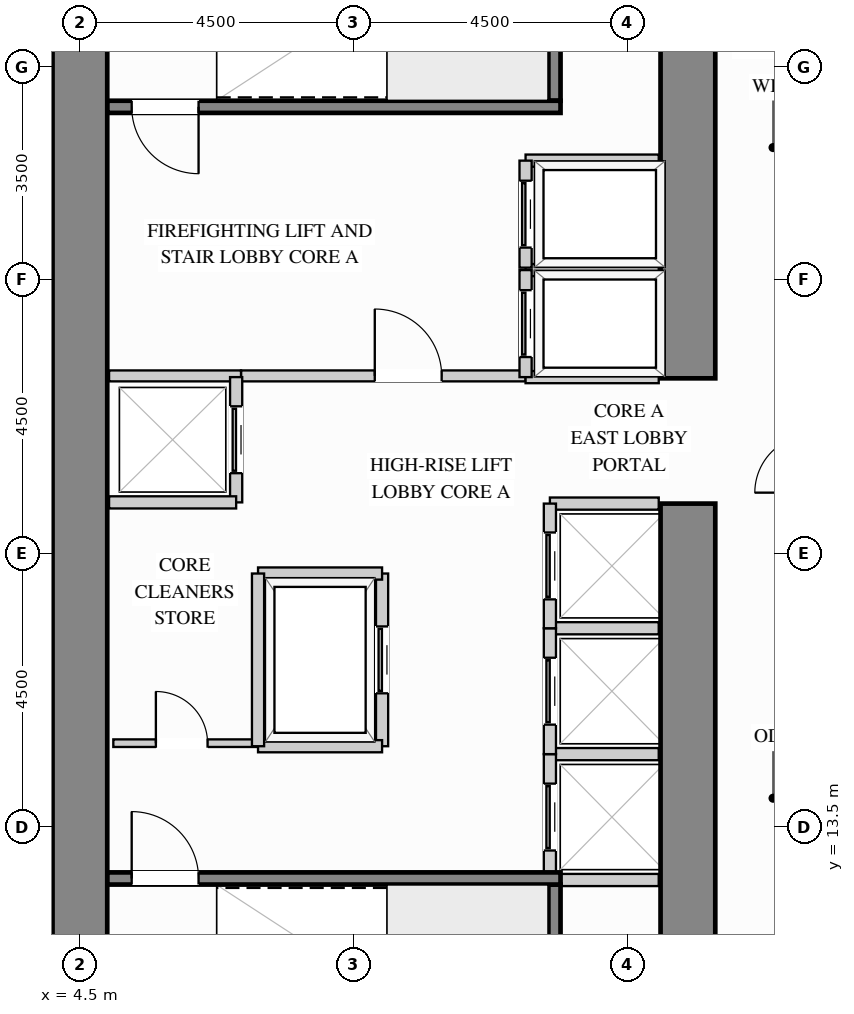
"""IFC4 building model, lengths in metres.
Left out: names, types, materials, properties, quantities, classifications, styles, units other than length and angle.
Written with IfcOpenShell. Run it as: python <this file> out.ifc"""

import sys

from ifc_helpers import new_model, si_unit, direction, frame, frame_2d, origin, place, context, subcontext, project, spatial, rectangle, extrude, source, transform, mapped, element, fill, save


model = new_model("IFC4")
c1 = context("Model", 3, precision=1e-05, world=origin(), true_north=direction((0.0, 1.0)))
c2 = subcontext(c1, "Body", "Model", "MODEL_VIEW")
j1 = project(units=[si_unit("LENGTHUNIT", "METRE"), si_unit("PLANEANGLEUNIT", "RADIAN")], contexts=[c1])
p1 = place(None, origin())
s1 = spatial("IfcSite", under=j1, at=p1, CompositionType="ELEMENT")
p2 = place(p1, origin())
s2 = spatial("IfcBuilding", under=s1, at=p2, CompositionType="ELEMENT")
p3 = place(p2, frame((0.0, 0.0, 69.3)))
s3 = spatial("IfcBuildingStorey", under=s2, at=p3, CompositionType="ELEMENT", Elevation=69.3)
m1 = source(origin(), c2, "Body", "SweptSolid", [
    extrude(rectangle(XDim=9.87, YDim=0.9, at=frame_2d((4.935, 0.0))), origin(), (0.0, 0.0, 1.0), 3.32),
])
p4 = place(p3, frame((14.5, 8.95, 0.0), z_axis=(0.0, 0.0, 1.0), x_axis=(0.0, 1.0, 0.0)))
e1 = element("IfcWall", 1, at=p4, inside=s3, PredefinedType="SHEAR", context=c2, shape_type="MappedRepresentation", body=[
    mapped(m1, transform((0.0, 0.0, 0.0), x_axis=(1.0, 0.0, 0.0), y_axis=(0.0, 1.0, 0.0), z_axis=(0.0, 0.0, 1.0))),
])
m2 = source(origin(), c2, "Body", "SweptSolid", [
    extrude(rectangle(XDim=8.17, YDim=0.9, at=frame_2d((4.085, 0.0))), origin(), (0.0, 0.0, 1.0), 3.32),
])
p5 = place(p3, frame((14.5, 20.88, 0.0), z_axis=(0.0, 0.0, 1.0), x_axis=(0.0, 1.0, 0.0)))
e2 = element("IfcWall", 2, at=p5, inside=s3, PredefinedType="SHEAR", context=c2, shape_type="MappedRepresentation", body=[
    mapped(m2, transform((0.0, 0.0, 0.0), x_axis=(1.0, 0.0, 0.0), y_axis=(0.0, 1.0, 0.0), z_axis=(0.0, 0.0, 1.0))),
])
m3 = source(origin(), c2, "Body", "SweptSolid", [
    extrude(rectangle(XDim=20.1, YDim=0.9, at=frame_2d((10.05, 0.0))), origin(), (0.0, 0.0, 1.0), 3.32),
])
p6 = place(p3, frame((4.5, 8.95, 0.0), z_axis=(0.0, 0.0, 1.0), x_axis=(0.0, 1.0, 0.0)))
e3 = element("IfcWall", 3, at=p6, inside=s3, PredefinedType="SHEAR", context=c2, shape_type="MappedRepresentation", body=[
    mapped(m3, transform((0.0, 0.0, 0.0), x_axis=(1.0, 0.0, 0.0), y_axis=(0.0, 1.0, 0.0), z_axis=(0.0, 0.0, 1.0))),
])
p7 = place(p3, frame((7.15, 20.92, 0.0), z_axis=(0.0, 0.0, 1.0), x_axis=(1.0, 0.0, 0.0)))
e4 = element("IfcWall", 4, at=p7, inside=s3, PredefinedType="PARTITIONING", context=c2, shape_type="SweptSolid", body=[
    extrude(rectangle(XDim=4.68, YDim=0.18, at=frame_2d((2.34, 0.0))), origin(), (0.0, 0.0, 1.0), 3.305),
])
p8 = place(p7, frame((2.2, 0.0, 0.0)))
e5 = element("IfcOpeningElement", 5, at=p8, cuts=e4, PredefinedType="OPENING", context=c2, shape_type="SweptSolid", body=[
    extrude(rectangle(XDim=1.1, YDim=2.15, at=frame_2d((0.55, 1.075))), frame((0.0, 0.1, 0.0), z_axis=(0.0, -1.0, 0.0), x_axis=(1.0, 0.0, 0.0)), (0.0, 0.0, 1.0), 0.2),
])
m4 = source(origin(), c2, "Body", "SweptSolid", [
    extrude(rectangle(XDim=2.17, YDim=0.18, at=frame_2d((1.085, 0.0))), origin(), (0.0, 0.0, 1.0), 3.305),
])
p9 = place(p3, frame((4.98, 20.92, 0.0), z_axis=(0.0, 0.0, 1.0), x_axis=(1.0, 0.0, 0.0)))
e6 = element("IfcWall", 6, at=p9, inside=s3, PredefinedType="PARTITIONING", context=c2, shape_type="MappedRepresentation", body=[
    mapped(m4, transform((0.0, 0.0, 0.0), x_axis=(1.0, 0.0, 0.0), y_axis=(0.0, 1.0, 0.0), z_axis=(0.0, 0.0, 1.0))),
])
p10 = place(p3, frame((5.05, 14.88, 0.0), z_axis=(0.0, 0.0, 1.0), x_axis=(1.0, 0.0, 0.0)))
e7 = element("IfcWall", 7, at=p10, inside=s3, PredefinedType="PARTITIONING", context=c2, shape_type="SweptSolid", body=[
    extrude(rectangle(XDim=2.35, YDim=0.125, at=frame_2d((1.175, 0.0))), origin(), (0.0, 0.0, 1.0), 3.305),
])
p11 = place(p10, frame((0.7, 0.0, 0.0)))
e8 = element("IfcOpeningElement", 8, at=p11, cuts=e7, PredefinedType="OPENING", context=c2, shape_type="SweptSolid", body=[
    extrude(rectangle(XDim=0.85, YDim=2.1, at=frame_2d((0.425, 1.05))), frame((0.0, 0.073, 0.0), z_axis=(0.0, -1.0, 0.0), x_axis=(1.0, 0.0, 0.0)), (0.0, 0.0, 1.0), 0.145),
])
m5 = source(origin(), c2, "Body", "SweptSolid", [
    extrude(rectangle(XDim=2.19, YDim=0.2, at=frame_2d((1.095, 0.0))), origin(), (0.0, 0.0, 1.0), 3.305),
])
for number, where, z_axis, x_axis in (
    (9, (11.83, 22.66, 0.0), (0.0, 0.0, 1.0), (1.0, 0.0, 0.0)),
    (10, (11.83, 20.9, 0.0), (0.0, 0.0, 1.0), (1.0, 0.0, 0.0)),
):
    element("IfcWall", number, at=place(p3, frame(where, z_axis=z_axis, x_axis=x_axis)), inside=s3, PredefinedType="PARTITIONING", context=c2, shape_type="MappedRepresentation", body=[
        mapped(m5, transform((0.0, 0.0, 0.0), x_axis=(1.0, 0.0, 0.0), y_axis=(0.0, 1.0, 0.0), z_axis=(0.0, 0.0, 1.0))),
    ])
p12 = place(p3, frame((11.83, 20.9, 0.0), z_axis=(0.0, 0.0, 1.0), x_axis=(0.0, 1.0, 0.0)))
e11 = element("IfcWall", 11, at=p12, inside=s3, PredefinedType="PARTITIONING", context=c2, shape_type="SweptSolid", body=[
    extrude(rectangle(XDim=1.76, YDim=0.2, at=frame_2d((0.88, 0.0))), origin(), (0.0, 0.0, 1.0), 3.305),
])
p13 = place(p12, frame((0.33, 0.0, 0.0)))
e12 = element("IfcOpeningElement", 12, at=p13, cuts=e11, PredefinedType="OPENING", context=c2, shape_type="SweptSolid", body=[
    extrude(rectangle(XDim=1.1, YDim=2.2, at=frame_2d((0.55, 1.1))), frame((0.0, 0.11, 0.0), z_axis=(0.0, -1.0, 0.0), x_axis=(1.0, 0.0, 0.0)), (0.0, 0.0, 1.0), 0.22),
])
p14 = place(p3, frame((11.83, 24.46, 0.0), z_axis=(0.0, 0.0, 1.0), x_axis=(1.0, 0.0, 0.0)))
e13 = element("IfcWall", 13, at=p14, inside=s3, PredefinedType="PARTITIONING", context=c2, shape_type="MappedRepresentation", body=[
    mapped(m5, transform((0.0, 0.0, 0.0), x_axis=(1.0, 0.0, 0.0), y_axis=(0.0, 1.0, 0.0), z_axis=(0.0, 0.0, 1.0))),
])
p15 = place(p3, frame((11.83, 22.7, 0.0), z_axis=(0.0, 0.0, 1.0), x_axis=(0.0, 1.0, 0.0)))
e14 = element("IfcWall", 14, at=p15, inside=s3, PredefinedType="PARTITIONING", context=c2, shape_type="SweptSolid", body=[
    extrude(rectangle(XDim=1.76, YDim=0.2, at=frame_2d((0.88, 0.0))), origin(), (0.0, 0.0, 1.0), 3.305),
])
p16 = place(p15, frame((0.33, 0.0, 0.0)))
e15 = element("IfcOpeningElement", 15, at=p16, cuts=e14, PredefinedType="OPENING", context=c2, shape_type="SweptSolid", body=[
    extrude(rectangle(XDim=1.1, YDim=2.2, at=frame_2d((0.55, 1.1))), frame((0.0, 0.11, 0.0), z_axis=(0.0, -1.0, 0.0), x_axis=(1.0, 0.0, 0.0)), (0.0, 0.0, 1.0), 0.22),
])
m6 = source(origin(), c2, "Body", "SweptSolid", [
    extrude(rectangle(XDim=1.79, YDim=0.2, at=frame_2d((0.895, 0.0))), origin(), (0.0, 0.0, 1.0), 3.305),
])
for number, where, z_axis, x_axis in (
    (16, (12.23, 14.7, 0.0), (0.0, 0.0, 1.0), (1.0, 0.0, 0.0)),
    (17, (12.23, 12.63, 0.0), (0.0, 0.0, 1.0), (1.0, 0.0, 0.0)),
):
    element("IfcWall", number, at=place(p3, frame(where, z_axis=z_axis, x_axis=x_axis)), inside=s3, PredefinedType="PARTITIONING", context=c2, shape_type="MappedRepresentation", body=[
        mapped(m6, transform((0.0, 0.0, 0.0), x_axis=(1.0, 0.0, 0.0), y_axis=(0.0, 1.0, 0.0), z_axis=(0.0, 0.0, 1.0))),
    ])
p17 = place(p3, frame((12.23, 12.63, 0.0), z_axis=(0.0, 0.0, 1.0), x_axis=(0.0, 1.0, 0.0)))
e18 = element("IfcWall", 18, at=p17, inside=s3, PredefinedType="PARTITIONING", context=c2, shape_type="SweptSolid", body=[
    extrude(rectangle(XDim=2.07, YDim=0.2, at=frame_2d((1.035, 0.0))), origin(), (0.0, 0.0, 1.0), 3.305),
])
p18 = place(p17, frame((0.485, 0.0, 0.0)))
e19 = element("IfcOpeningElement", 19, at=p18, cuts=e18, PredefinedType="OPENING", context=c2, shape_type="SweptSolid", body=[
    extrude(rectangle(XDim=1.1, YDim=2.2, at=frame_2d((0.55, 1.1))), frame((0.0, 0.11, 0.0), z_axis=(0.0, -1.0, 0.0), x_axis=(1.0, 0.0, 0.0)), (0.0, 0.0, 1.0), 0.22),
])
p19 = place(p3, frame((12.23, 16.77, 0.0), z_axis=(0.0, 0.0, 1.0), x_axis=(1.0, 0.0, 0.0)))
e20 = element("IfcWall", 20, at=p19, inside=s3, PredefinedType="PARTITIONING", context=c2, shape_type="MappedRepresentation", body=[
    mapped(m6, transform((0.0, 0.0, 0.0), x_axis=(1.0, 0.0, 0.0), y_axis=(0.0, 1.0, 0.0), z_axis=(0.0, 0.0, 1.0))),
])
p20 = place(p3, frame((12.23, 14.7, 0.0), z_axis=(0.0, 0.0, 1.0), x_axis=(0.0, 1.0, 0.0)))
e21 = element("IfcWall", 21, at=p20, inside=s3, PredefinedType="PARTITIONING", context=c2, shape_type="SweptSolid", body=[
    extrude(rectangle(XDim=2.07, YDim=0.2, at=frame_2d((1.035, 0.0))), origin(), (0.0, 0.0, 1.0), 3.305),
])
p21 = place(p20, frame((0.485, 0.0, 0.0)))
e22 = element("IfcOpeningElement", 22, at=p21, cuts=e21, PredefinedType="OPENING", context=c2, shape_type="SweptSolid", body=[
    extrude(rectangle(XDim=1.1, YDim=2.2, at=frame_2d((0.55, 1.1))), frame((0.0, 0.11, 0.0), z_axis=(0.0, -1.0, 0.0), x_axis=(1.0, 0.0, 0.0)), (0.0, 0.0, 1.0), 0.22),
])
p22 = place(p3, frame((12.23, 18.82, 0.0), z_axis=(0.0, 0.0, 1.0), x_axis=(1.0, 0.0, 0.0)))
e23 = element("IfcWall", 23, at=p22, inside=s3, PredefinedType="PARTITIONING", context=c2, shape_type="MappedRepresentation", body=[
    mapped(m6, transform((0.0, 0.0, 0.0), x_axis=(1.0, 0.0, 0.0), y_axis=(0.0, 1.0, 0.0), z_axis=(0.0, 0.0, 1.0))),
])
p23 = place(p3, frame((12.23, 16.77, 0.0), z_axis=(0.0, 0.0, 1.0), x_axis=(0.0, 1.0, 0.0)))
e24 = element("IfcWall", 24, at=p23, inside=s3, PredefinedType="PARTITIONING", context=c2, shape_type="SweptSolid", body=[
    extrude(rectangle(XDim=2.05, YDim=0.2, at=frame_2d((1.025, 0.0))), origin(), (0.0, 0.0, 1.0), 3.305),
])
p24 = place(p23, frame((0.475, 0.0, 0.0)))
e25 = element("IfcOpeningElement", 25, at=p24, cuts=e24, PredefinedType="OPENING", context=c2, shape_type="SweptSolid", body=[
    extrude(rectangle(XDim=1.1, YDim=2.2, at=frame_2d((0.55, 1.1))), frame((0.0, 0.11, 0.0), z_axis=(0.0, -1.0, 0.0), x_axis=(1.0, 0.0, 0.0)), (0.0, 0.0, 1.0), 0.22),
])
p25 = place(p3, frame((7.07, 18.84, 0.0), z_axis=(0.0, 0.0, 1.0), x_axis=(0.0, 1.0, 0.0)))
e26 = element("IfcWall", 26, at=p25, inside=s3, PredefinedType="PARTITIONING", context=c2, shape_type="SweptSolid", body=[
    extrude(rectangle(XDim=2.06, YDim=0.2, at=frame_2d((1.03, 0.0))), origin(), (0.0, 0.0, 1.0), 3.305),
])
p26 = place(p25, frame((0.48, 0.0, 0.0)))
e27 = element("IfcOpeningElement", 27, at=p26, cuts=e26, PredefinedType="OPENING", context=c2, shape_type="SweptSolid", body=[
    extrude(rectangle(XDim=1.1, YDim=2.2, at=frame_2d((0.55, 1.1))), frame((0.0, 0.11, 0.0), z_axis=(0.0, -1.0, 0.0), x_axis=(1.0, 0.0, 0.0)), (0.0, 0.0, 1.0), 0.22),
])
m7 = source(origin(), c2, "Body", "SweptSolid", [
    extrude(rectangle(XDim=2.09, YDim=0.2, at=frame_2d((1.045, 0.0))), origin(), (0.0, 0.0, 1.0), 3.305),
])
p27 = place(p3, frame((4.98, 18.84, 0.0), z_axis=(0.0, 0.0, 1.0), x_axis=(1.0, 0.0, 0.0)))
e28 = element("IfcWall", 28, at=p27, inside=s3, PredefinedType="PARTITIONING", context=c2, shape_type="MappedRepresentation", body=[
    mapped(m7, transform((0.0, 0.0, 0.0), x_axis=(1.0, 0.0, 0.0), y_axis=(0.0, 1.0, 0.0), z_axis=(0.0, 0.0, 1.0))),
])
p28 = place(p3, frame((9.47, 14.83, 0.0), z_axis=(0.0, 0.0, 1.0), x_axis=(0.0, 1.0, 0.0)))
e29 = element("IfcWall", 29, at=p28, inside=s3, PredefinedType="PARTITIONING", context=c2, shape_type="SweptSolid", body=[
    extrude(rectangle(XDim=2.84, YDim=0.2, at=frame_2d((1.42, 0.0))), origin(), (0.0, 0.0, 1.0), 3.305),
])
p29 = place(p28, frame((0.87, 0.0, 0.0)))
e30 = element("IfcOpeningElement", 30, at=p29, cuts=e29, PredefinedType="OPENING", context=c2, shape_type="SweptSolid", body=[
    extrude(rectangle(XDim=1.1, YDim=2.2, at=frame_2d((0.55, 1.1))), frame((0.0, 0.11, 0.0), z_axis=(0.0, -1.0, 0.0), x_axis=(1.0, 0.0, 0.0)), (0.0, 0.0, 1.0), 0.22),
])
m8 = source(origin(), c2, "Body", "SweptSolid", [
    extrude(rectangle(XDim=2.04, YDim=0.2, at=frame_2d((1.02, 0.0))), origin(), (0.0, 0.0, 1.0), 3.305),
])
for number, where, z_axis, x_axis in (
    (31, (7.43, 17.67, 0.0), (0.0, 0.0, 1.0), (1.0, 0.0, 0.0)),
    (32, (7.43, 14.83, 0.0), (0.0, 0.0, 1.0), (1.0, 0.0, 0.0)),
):
    element("IfcWall", number, at=place(p3, frame(where, z_axis=z_axis, x_axis=x_axis)), inside=s3, PredefinedType="PARTITIONING", context=c2, shape_type="MappedRepresentation", body=[
        mapped(m8, transform((0.0, 0.0, 0.0), x_axis=(1.0, 0.0, 0.0), y_axis=(0.0, 1.0, 0.0), z_axis=(0.0, 0.0, 1.0))),
    ])
m9 = source(origin(), c2, "Body", "SweptSolid", [
    extrude(rectangle(XDim=2.84, YDim=0.2, at=frame_2d((1.42, 0.0))), origin(), (0.0, 0.0, 1.0), 3.305),
])
p30 = place(p3, frame((7.43, 14.83, 0.0), z_axis=(0.0, 0.0, 1.0), x_axis=(0.0, 1.0, 0.0)))
e33 = element("IfcWall", 33, at=p30, inside=s3, PredefinedType="PARTITIONING", context=c2, shape_type="MappedRepresentation", body=[
    mapped(m9, transform((0.0, 0.0, 0.0), x_axis=(1.0, 0.0, 0.0), y_axis=(0.0, 1.0, 0.0), z_axis=(0.0, 0.0, 1.0))),
])
m10 = source(origin(), c2, "Body", "SweptSolid", [
    extrude(rectangle(XDim=3.603, YDim=0.2, at=frame_2d((1.802, 0.0))), origin(), (0.0, 0.0, 1.0), 3.32),
])
p31 = place(p3, frame((12.305, 8.952, 0.0), z_axis=(0.0, 0.0, 1.0), x_axis=(0.0, 1.0, 0.0)))
e34 = element("IfcWall", 34, at=p31, inside=s3, PredefinedType="SHEAR", context=c2, shape_type="MappedRepresentation", body=[
    mapped(m10, transform((0.0, 0.0, 0.0), x_axis=(1.0, 0.0, 0.0), y_axis=(0.0, 1.0, 0.0), z_axis=(0.0, 0.0, 1.0))),
])
p32 = place(p3, frame((4.952, 12.655, 0.0), z_axis=(0.0, 0.0, 1.0), x_axis=(1.0, 0.0, 0.0)))
e35 = element("IfcWall", 35, at=p32, inside=s3, PredefinedType="SHEAR", context=c2, shape_type="SweptSolid", body=[
    extrude(rectangle(XDim=7.453, YDim=0.2, at=frame_2d((3.727, 0.0))), origin(), (0.0, 0.0, 1.0), 3.32),
])
p33 = place(p32, frame((0.4, 0.0, 0.0)))
e36 = element("IfcOpeningElement", 36, at=p33, cuts=e35, PredefinedType="OPENING", context=c2, shape_type="SweptSolid", body=[
    extrude(rectangle(XDim=1.1, YDim=2.15, at=frame_2d((0.55, 1.075))), frame((0.0, 0.11, 0.0), z_axis=(0.0, -1.0, 0.0), x_axis=(1.0, 0.0, 0.0)), (0.0, 0.0, 1.0), 0.22),
])
p34 = place(p3, frame((12.305, 25.445, 0.0), z_axis=(0.0, 0.0, 1.0), x_axis=(0.0, 1.0, 0.0)))
e37 = element("IfcWall", 37, at=p34, inside=s3, PredefinedType="SHEAR", context=c2, shape_type="MappedRepresentation", body=[
    mapped(m10, transform((0.0, 0.0, 0.0), x_axis=(1.0, 0.0, 0.0), y_axis=(0.0, 1.0, 0.0), z_axis=(0.0, 0.0, 1.0))),
])
p35 = place(p3, frame((4.952, 25.345, 0.0), z_axis=(0.0, 0.0, 1.0), x_axis=(1.0, 0.0, 0.0)))
e38 = element("IfcWall", 38, at=p35, inside=s3, PredefinedType="SHEAR", context=c2, shape_type="SweptSolid", body=[
    extrude(rectangle(XDim=7.453, YDim=0.2, at=frame_2d((3.727, 0.0))), origin(), (0.0, 0.0, 1.0), 3.32),
])
p36 = place(p35, frame((0.4, 0.0, 0.0)))
e39 = element("IfcOpeningElement", 39, at=p36, cuts=e38, PredefinedType="OPENING", context=c2, shape_type="SweptSolid", body=[
    extrude(rectangle(XDim=1.1, YDim=2.15, at=frame_2d((0.55, 1.075))), frame((0.0, 0.11, 0.0), z_axis=(0.0, -1.0, 0.0), x_axis=(1.0, 0.0, 0.0)), (0.0, 0.0, 1.0), 0.22),
])
m11 = source(origin(), c2, "Body", "SweptSolid", [
    extrude(rectangle(XDim=1.1, YDim=2.15, at=frame_2d((0.55, 1.075))), frame((0.0, 0.025, 0.0), z_axis=(0.0, -1.0, 0.0), x_axis=(1.0, 0.0, 0.0)), (0.0, 0.0, 1.0), 0.05),
])
p37 = place(p8, origin())
e40 = element("IfcDoor", 40, at=p37, inside=s3, OperationType="SINGLE_SWING_LEFT", PredefinedType="DOOR", context=c2, shape_type="MappedRepresentation", body=[
    mapped(m11, transform((0.0, 0.0, 0.0), x_axis=(1.0, 0.0, 0.0), y_axis=(0.0, 1.0, 0.0), z_axis=(0.0, 0.0, 1.0))),
])
fill(e5, e40)
m12 = source(origin(), c2, "Body", "SweptSolid", [
    extrude(rectangle(XDim=1.1, YDim=2.2, at=frame_2d((0.55, 1.1))), frame((0.0, 0.025, 0.0), z_axis=(0.0, -1.0, 0.0), x_axis=(1.0, 0.0, 0.0)), (0.0, 0.0, 1.0), 0.05),
])
p38 = place(p13, origin())
e41 = element("IfcDoor", 41, at=p38, inside=s3, OperationType="SLIDING_TO_LEFT", PredefinedType="DOOR", context=c2, shape_type="MappedRepresentation", body=[
    mapped(m12, transform((0.0, 0.0, 0.0), x_axis=(1.0, 0.0, 0.0), y_axis=(0.0, 1.0, 0.0), z_axis=(0.0, 0.0, 1.0))),
])
fill(e12, e41)
p39 = place(p16, origin())
e42 = element("IfcDoor", 42, at=p39, inside=s3, OperationType="SLIDING_TO_LEFT", PredefinedType="DOOR", context=c2, shape_type="MappedRepresentation", body=[
    mapped(m12, transform((0.0, 0.0, 0.0), x_axis=(1.0, 0.0, 0.0), y_axis=(0.0, 1.0, 0.0), z_axis=(0.0, 0.0, 1.0))),
])
fill(e15, e42)
p40 = place(p18, origin())
e43 = element("IfcDoor", 43, at=p40, inside=s3, OperationType="SLIDING_TO_LEFT", PredefinedType="DOOR", context=c2, shape_type="MappedRepresentation", body=[
    mapped(m12, transform((0.0, 0.0, 0.0), x_axis=(1.0, 0.0, 0.0), y_axis=(0.0, 1.0, 0.0), z_axis=(0.0, 0.0, 1.0))),
])
fill(e19, e43)
p41 = place(p21, origin())
e44 = element("IfcDoor", 44, at=p41, inside=s3, OperationType="SLIDING_TO_LEFT", PredefinedType="DOOR", context=c2, shape_type="MappedRepresentation", body=[
    mapped(m12, transform((0.0, 0.0, 0.0), x_axis=(1.0, 0.0, 0.0), y_axis=(0.0, 1.0, 0.0), z_axis=(0.0, 0.0, 1.0))),
])
fill(e22, e44)
p42 = place(p24, origin())
e45 = element("IfcDoor", 45, at=p42, inside=s3, OperationType="SLIDING_TO_LEFT", PredefinedType="DOOR", context=c2, shape_type="MappedRepresentation", body=[
    mapped(m12, transform((0.0, 0.0, 0.0), x_axis=(1.0, 0.0, 0.0), y_axis=(0.0, 1.0, 0.0), z_axis=(0.0, 0.0, 1.0))),
])
fill(e25, e45)
p43 = place(p26, origin())
e46 = element("IfcDoor", 46, at=p43, inside=s3, OperationType="SLIDING_TO_LEFT", PredefinedType="DOOR", context=c2, shape_type="MappedRepresentation", body=[
    mapped(m12, transform((0.0, 0.0, 0.0), x_axis=(1.0, 0.0, 0.0), y_axis=(0.0, 1.0, 0.0), z_axis=(0.0, 0.0, 1.0))),
])
fill(e27, e46)
p44 = place(p29, origin())
e47 = element("IfcDoor", 47, at=p44, inside=s3, OperationType="SLIDING_TO_LEFT", PredefinedType="DOOR", context=c2, shape_type="MappedRepresentation", body=[
    mapped(m12, transform((0.0, 0.0, 0.0), x_axis=(1.0, 0.0, 0.0), y_axis=(0.0, 1.0, 0.0), z_axis=(0.0, 0.0, 1.0))),
])
fill(e30, e47)
m13 = source(origin(), c2, "Body", "SweptSolid", [
    extrude(rectangle(XDim=0.85, YDim=2.1, at=frame_2d((0.425, 1.05))), frame((0.0, 0.025, 0.0), z_axis=(0.0, -1.0, 0.0), x_axis=(1.0, 0.0, 0.0)), (0.0, 0.0, 1.0), 0.05),
])
p45 = place(p11, origin())
e48 = element("IfcDoor", 48, at=p45, inside=s3, OperationType="SINGLE_SWING_LEFT", PredefinedType="DOOR", context=c2, shape_type="MappedRepresentation", body=[
    mapped(m13, transform((0.0, 0.0, 0.0), x_axis=(1.0, 0.0, 0.0), y_axis=(0.0, 1.0, 0.0), z_axis=(0.0, 0.0, 1.0))),
])
fill(e8, e48)
m14 = source(origin(), c2, "Body", "SweptSolid", [
    extrude(rectangle(XDim=1.1, YDim=2.15, at=frame_2d((0.55, 1.075))), frame((0.0, 0.025, 0.0), z_axis=(0.0, -1.0, 0.0), x_axis=(1.0, 0.0, 0.0)), (0.0, 0.0, 1.0), 0.05),
])
p46 = place(p33, origin())
e49 = element("IfcDoor", 49, at=p46, inside=s3, OperationType="SINGLE_SWING_LEFT", PredefinedType="DOOR", context=c2, shape_type="MappedRepresentation", body=[
    mapped(m14, transform((0.0, 0.0, 0.0), x_axis=(1.0, 0.0, 0.0), y_axis=(0.0, 1.0, 0.0), z_axis=(0.0, 0.0, 1.0))),
])
fill(e36, e49)
p47 = place(p36, origin())
e50 = element("IfcDoor", 50, at=p47, inside=s3, OperationType="SINGLE_SWING_RIGHT", PredefinedType="DOOR", context=c2, shape_type="MappedRepresentation", body=[
    mapped(m14, transform((0.0, 0.0, 0.0), x_axis=(1.0, 0.0, 0.0), y_axis=(0.0, 1.0, 0.0), z_axis=(0.0, 0.0, 1.0))),
])
fill(e39, e50)
save(model, sys.argv[1])
